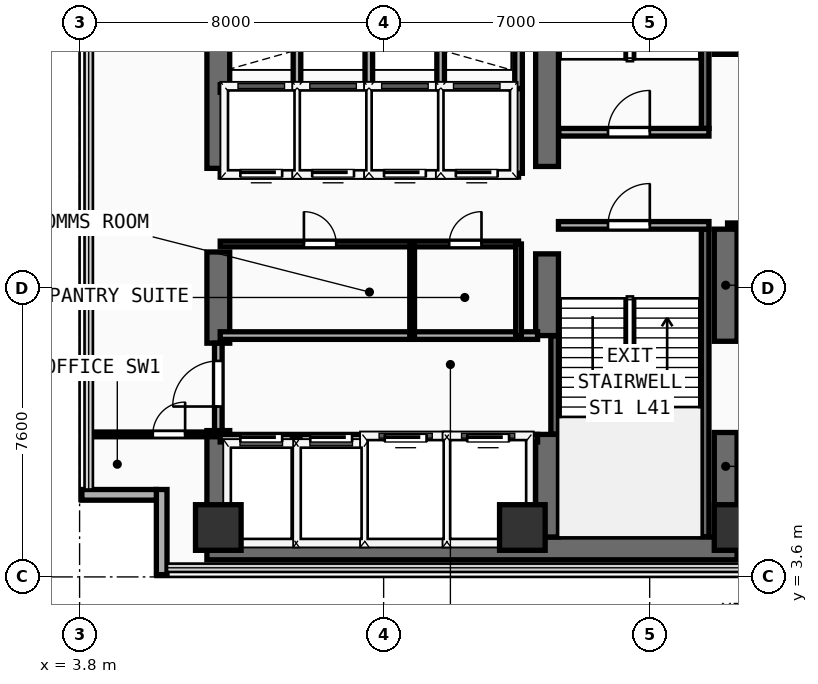
"""IFC4 building model, lengths in metres.
Left out: names, types, materials, properties, quantities, classifications, styles, units other than length and angle.
Written with IfcOpenShell. Run it as: python <this file> out.ifc"""

import sys

from ifc_helpers import new_model, si_unit, direction, frame, frame_2d, origin, origin_2d, place, context, subcontext, project, spatial, rectangle, extrude, element, fill, save


model = new_model("IFC4")
c1 = context("Model", 3, precision=1e-05, world=origin(), true_north=direction((0.0, 1.0)))
c2 = subcontext(c1, "Body", "Model", "MODEL_VIEW")
j1 = project(units=[si_unit("LENGTHUNIT", "METRE"), si_unit("PLANEANGLEUNIT", "RADIAN")], contexts=[c1])
p1 = place(None, origin())
s1 = spatial("IfcSite", under=j1, at=p1, CompositionType="ELEMENT")
p2 = place(p1, origin())
s2 = spatial("IfcBuilding", under=s1, at=p2, CompositionType="ELEMENT")
p3 = place(p2, frame((0.0, 0.0, 161.4)))
s3 = spatial("IfcBuildingStorey", under=s2, at=p3, CompositionType="ELEMENT", Elevation=161.4)
p4 = place(p3, frame((7.15, 4.35, 0.0), z_axis=(0.0, 0.0, 1.0), x_axis=(1.0, 0.0, 0.0)))
e1 = element("IfcWall", 1, at=p4, inside=s3, PredefinedType="SHEAR", context=c2, shape_type="SweptSolid", body=[
    extrude(rectangle(XDim=13.95, YDim=0.6, at=frame_2d((6.975, 0.0))), origin(), (0.0, 0.0, 1.0), 3.56),
])
p5 = place(p3, frame((7.45, 4.65, 0.0), z_axis=(0.0, 0.0, 1.0), x_axis=(0.0, 1.0, 0.0)))
e2 = element("IfcWall", 2, at=p5, inside=s3, PredefinedType="SHEAR", context=c2, shape_type="SweptSolid", body=[
    extrude(rectangle(XDim=2.8, YDim=0.6, at=frame_2d((1.4, 0.0))), origin(), (0.0, 0.0, 1.0), 3.56),
])
p6 = place(p3, frame((7.45, 9.75, 0.0), z_axis=(0.0, 0.0, 1.0), x_axis=(0.0, 1.0, 0.0)))
e3 = element("IfcWall", 3, at=p6, inside=s3, PredefinedType="SHEAR", context=c2, shape_type="SweptSolid", body=[
    extrude(rectangle(XDim=2.4, YDim=0.6, at=frame_2d((1.2, 0.0))), origin(), (0.0, 0.0, 1.0), 3.56),
])
p7 = place(p3, frame((7.45, 14.35, 0.0), z_axis=(0.0, 0.0, 1.0), x_axis=(0.0, 1.0, 0.0)))
e4 = element("IfcWall", 4, at=p7, inside=s3, PredefinedType="SHEAR", context=c2, shape_type="SweptSolid", body=[
    extrude(rectangle(XDim=4.81, YDim=0.6, at=frame_2d((2.405, 0.0))), origin(), (0.0, 0.0, 1.0), 3.56),
])
p8 = place(p3, frame((20.8, 4.65, 0.0), z_axis=(0.0, 0.0, 1.0), x_axis=(0.0, 1.0, 0.0)))
e5 = element("IfcWall", 5, at=p8, inside=s3, PredefinedType="SHEAR", context=c2, shape_type="SweptSolid", body=[
    extrude(rectangle(XDim=2.75, YDim=0.6, at=frame_2d((1.375, 0.0))), origin(), (0.0, 0.0, 1.0), 3.56),
])
p9 = place(p3, frame((20.8, 9.8, 0.0), z_axis=(0.0, 0.0, 1.0), x_axis=(0.0, 1.0, 0.0)))
e6 = element("IfcWall", 6, at=p9, inside=s3, PredefinedType="SHEAR", context=c2, shape_type="SweptSolid", body=[
    extrude(rectangle(XDim=2.95, YDim=0.6, at=frame_2d((1.475, 0.0))), origin(), (0.0, 0.0, 1.0), 3.56),
])
p10 = place(p3, frame((20.8, 17.35, 0.0), z_axis=(0.0, 0.0, 1.0), x_axis=(0.0, 1.0, 0.0)))
e7 = element("IfcWall", 7, at=p10, inside=s3, PredefinedType="SHEAR", context=c2, shape_type="SweptSolid", body=[
    extrude(rectangle(XDim=6.15, YDim=0.6, at=frame_2d((3.075, 0.0))), origin(), (0.0, 0.0, 1.0), 3.56),
])
p11 = place(p3, frame((16.1, 4.65, 0.0), z_axis=(0.0, 0.0, 1.0), x_axis=(0.0, 1.0, 0.0)))
e8 = element("IfcWall", 8, at=p11, inside=s3, PredefinedType="SHEAR", context=c2, shape_type="SweptSolid", body=[
    extrude(rectangle(XDim=2.7, YDim=0.6, at=frame_2d((1.35, 0.0))), origin(), (0.0, 0.0, 1.0), 3.56),
])
p12 = place(p3, frame((16.1, 9.95, 0.0), z_axis=(0.0, 0.0, 1.0), x_axis=(0.0, 1.0, 0.0)))
e9 = element("IfcWall", 9, at=p12, inside=s3, PredefinedType="SHEAR", context=c2, shape_type="SweptSolid", body=[
    extrude(rectangle(XDim=2.15, YDim=0.6, at=frame_2d((1.075, 0.0))), origin(), (0.0, 0.0, 1.0), 3.56),
])
p13 = place(p3, frame((16.1, 14.4, 0.0), z_axis=(0.0, 0.0, 1.0), x_axis=(0.0, 1.0, 0.0)))
e10 = element("IfcWall", 10, at=p13, inside=s3, PredefinedType="SHEAR", context=c2, shape_type="SweptSolid", body=[
    extrude(rectangle(XDim=9.1, YDim=0.6, at=frame_2d((4.55, 0.0))), origin(), (0.0, 0.0, 1.0), 3.56),
])
for number, where, z_axis, x_axis in (
    (11, (7.45, 4.9, 0.0), (0.0, 0.0, 1.0), (1.0, 0.0, 0.0)),
    (12, (15.45, 4.9, 0.0), (0.0, 0.0, 1.0), (1.0, 0.0, 0.0)),
    (13, (21.1, 4.9, 0.0), (0.0, 0.0, 1.0), (1.0, 0.0, 0.0)),
):
    element("IfcColumn", number, at=place(p3, frame(where, z_axis=z_axis, x_axis=x_axis)), inside=s3, PredefinedType="COLUMN", context=c2, shape_type="SweptSolid", body=[
        extrude(rectangle(XDim=1.2, YDim=1.2, at=origin_2d()), origin(), (0.0, 0.0, 1.0), 3.56),
    ])
p14 = place(p3, frame((5.96, 3.66, 0.0), z_axis=(0.0, 0.0, 1.0), x_axis=(0.0, 1.0, 0.0)))
e14 = element("IfcWall", 14, at=p14, inside=s3, PredefinedType="SOLIDWALL", context=c2, shape_type="SweptSolid", body=[
    extrude(rectangle(XDim=2.24, YDim=0.28, at=frame_2d((1.12, 0.0))), origin(), (0.0, 0.0, 1.0), 3.56),
])
p15 = place(p3, frame((3.86, 5.76, 0.0), z_axis=(0.0, 0.0, 1.0), x_axis=(1.0, 0.0, 0.0)))
e15 = element("IfcWall", 15, at=p15, inside=s3, PredefinedType="SOLIDWALL", context=c2, shape_type="SweptSolid", body=[
    extrude(rectangle(XDim=1.96, YDim=0.28, at=frame_2d((0.98, 0.0))), origin(), (0.0, 0.0, 1.0), 3.56),
])
p16 = place(p3, frame((16.3, 7.36, 0.0), z_axis=(0.0, 0.0, 1.0), x_axis=(0.0, 1.0, 0.0)))
e16 = element("IfcWall", 16, at=p16, inside=s3, PredefinedType="SHEAR", context=c2, shape_type="SweptSolid", body=[
    extrude(rectangle(XDim=2.58, YDim=0.2, at=frame_2d((1.29, 0.0))), origin(), (0.0, 0.0, 1.0), 3.56),
])
p17 = place(p3, frame((20.26, 4.66, 0.0), z_axis=(0.0, 0.0, 1.0), x_axis=(0.0, 1.0, 0.0)))
e17 = element("IfcWall", 17, at=p17, inside=s3, PredefinedType="SHEAR", context=c2, shape_type="SweptSolid", body=[
    extrude(rectangle(XDim=8.09, YDim=0.2, at=frame_2d((4.045, 0.0))), origin(), (0.0, 0.0, 1.0), 3.56),
])
p18 = place(p3, frame((16.4, 12.85, 0.0), z_axis=(0.0, 0.0, 1.0), x_axis=(1.0, 0.0, 0.0)))
e18 = element("IfcWall", 18, at=p18, inside=s3, PredefinedType="PARTITIONING", context=c2, shape_type="SweptSolid", body=[
    extrude(rectangle(XDim=3.96, YDim=0.2, at=frame_2d((1.98, 0.0))), origin(), (0.0, 0.0, 1.0), 3.56),
])
p19 = place(p18, frame((1.304, 0.0, 0.0)))
e19 = element("IfcOpeningElement", 19, at=p19, cuts=e18, PredefinedType="OPENING", context=c2, shape_type="SweptSolid", body=[
    extrude(rectangle(XDim=1.1, YDim=2.2, at=frame_2d((0.55, 1.1))), frame((0.0, 0.11, 0.0), z_axis=(0.0, -1.0, 0.0), x_axis=(1.0, 0.0, 0.0)), (0.0, 0.0, 1.0), 0.22),
])
p20 = place(p3, frame((20.26, 15.4, 0.0), z_axis=(0.0, 0.0, 1.0), x_axis=(0.0, 1.0, 0.0)))
e20 = element("IfcWall", 20, at=p20, inside=s3, PredefinedType="SHEAR", context=c2, shape_type="SweptSolid", body=[
    extrude(rectangle(XDim=8.09, YDim=0.2, at=frame_2d((4.045, 0.0))), origin(), (0.0, 0.0, 1.0), 3.56),
])
p21 = place(p3, frame((16.41, 15.3, 0.0), z_axis=(0.0, 0.0, 1.0), x_axis=(1.0, 0.0, 0.0)))
e21 = element("IfcWall", 21, at=p21, inside=s3, PredefinedType="PARTITIONING", context=c2, shape_type="SweptSolid", body=[
    extrude(rectangle(XDim=3.95, YDim=0.2, at=frame_2d((1.975, 0.0))), origin(), (0.0, 0.0, 1.0), 3.56),
])
p22 = place(p21, frame((1.294, 0.0, 0.0)))
e22 = element("IfcOpeningElement", 22, at=p22, cuts=e21, PredefinedType="OPENING", context=c2, shape_type="SweptSolid", body=[
    extrude(rectangle(XDim=1.1, YDim=2.2, at=frame_2d((0.55, 1.1))), frame((0.0, 0.11, 0.0), z_axis=(0.0, -1.0, 0.0), x_axis=(1.0, 0.0, 0.0)), (0.0, 0.0, 1.0), 0.22),
])
p23 = place(p3, frame((7.5, 7.25, 0.0), z_axis=(0.0, 0.0, 1.0), x_axis=(1.0, 0.0, 0.0)))
e23 = element("IfcWall", 23, at=p23, inside=s3, PredefinedType="PARTITIONING", context=c2, shape_type="SweptSolid", body=[
    extrude(rectangle(XDim=8.35, YDim=0.2, at=frame_2d((4.175, 0.0))), origin(), (0.0, 0.0, 1.0), 3.56),
])
p24 = place(p23, frame((0.53, 0.0, 0.0)))
e24 = element("IfcOpeningElement", 24, at=p24, cuts=e23, PredefinedType="OPENING", context=c2, shape_type="SweptSolid", body=[
    extrude(rectangle(XDim=1.1, YDim=2.2, at=frame_2d((0.55, 1.1))), frame((0.0, 0.11, 0.0), z_axis=(0.0, -1.0, 0.0), x_axis=(1.0, 0.0, 0.0)), (0.0, 0.0, 1.0), 0.22),
])
p25 = place(p23, frame((2.37, 0.0, 0.0)))
e25 = element("IfcOpeningElement", 25, at=p25, cuts=e23, PredefinedType="OPENING", context=c2, shape_type="SweptSolid", body=[
    extrude(rectangle(XDim=1.1, YDim=2.2, at=frame_2d((0.55, 1.1))), frame((0.0, 0.11, 0.0), z_axis=(0.0, -1.0, 0.0), x_axis=(1.0, 0.0, 0.0)), (0.0, 0.0, 1.0), 0.22),
])
p26 = place(p23, frame((4.33, 0.0, 0.0)))
e26 = element("IfcOpeningElement", 26, at=p26, cuts=e23, PredefinedType="OPENING", context=c2, shape_type="SweptSolid", body=[
    extrude(rectangle(XDim=1.1, YDim=2.2, at=frame_2d((0.55, 1.1))), frame((0.0, 0.11, 0.0), z_axis=(0.0, -1.0, 0.0), x_axis=(1.0, 0.0, 0.0)), (0.0, 0.0, 1.0), 0.22),
])
p27 = place(p23, frame((6.5, 0.0, 0.0)))
e27 = element("IfcOpeningElement", 27, at=p27, cuts=e23, PredefinedType="OPENING", context=c2, shape_type="SweptSolid", body=[
    extrude(rectangle(XDim=1.1, YDim=2.2, at=frame_2d((0.55, 1.1))), frame((0.0, 0.11, 0.0), z_axis=(0.0, -1.0, 0.0), x_axis=(1.0, 0.0, 0.0)), (0.0, 0.0, 1.0), 0.22),
])
p28 = place(p3, frame((7.5, 9.95, 0.0), z_axis=(0.0, 0.0, 1.0), x_axis=(1.0, 0.0, 0.0)))
e28 = element("IfcWall", 28, at=p28, inside=s3, PredefinedType="PARTITIONING", context=c2, shape_type="SweptSolid", body=[
    extrude(rectangle(XDim=8.35, YDim=0.2, at=frame_2d((4.175, 0.0))), origin(), (0.0, 0.0, 1.0), 3.56),
])
for number, where, z_axis, x_axis in (
    (29, (9.5, 4.45, 0.0), (0.0, 0.0, 1.0), (0.0, 1.0, 0.0)),
    (30, (11.36, 4.45, 0.0), (0.0, 0.0, 1.0), (0.0, 1.0, 0.0)),
    (31, (13.46, 4.45, 0.0), (0.0, 0.0, 1.0), (0.0, 1.0, 0.0)),
):
    element("IfcWall", number, at=place(p3, frame(where, z_axis=z_axis, x_axis=x_axis)), inside=s3, PredefinedType="PARTITIONING", context=c2, shape_type="SweptSolid", body=[
        extrude(rectangle(XDim=2.8, YDim=0.2, at=frame_2d((1.4, 0.0))), origin(), (0.0, 0.0, 1.0), 3.56),
    ])
p29 = place(p3, frame((7.45, 7.45, 0.0), z_axis=(0.0, 0.0, 1.0), x_axis=(0.0, 1.0, 0.0)))
e32 = element("IfcWall", 32, at=p29, inside=s3, PredefinedType="PARTITIONING", context=c2, shape_type="SweptSolid", body=[
    extrude(rectangle(XDim=2.3, YDim=0.2, at=frame_2d((1.15, 0.0))), origin(), (0.0, 0.0, 1.0), 2.54),
])
p30 = place(p29, frame((0.633, 0.0, 0.0)))
e33 = element("IfcOpeningElement", 33, at=p30, cuts=e32, PredefinedType="OPENING", context=c2, shape_type="SweptSolid", body=[
    extrude(rectangle(XDim=1.2, YDim=2.25, at=frame_2d((0.6, 1.125))), frame((0.0, 0.11, 0.0), z_axis=(0.0, -1.0, 0.0), x_axis=(1.0, 0.0, 0.0)), (0.0, 0.0, 1.0), 0.22),
])
p31 = place(p3, frame((7.5, 12.36, 0.0), z_axis=(0.0, 0.0, 1.0), x_axis=(1.0, 0.0, 0.0)))
e34 = element("IfcWall", 34, at=p31, inside=s3, PredefinedType="PARTITIONING", context=c2, shape_type="SweptSolid", body=[
    extrude(rectangle(XDim=7.85, YDim=0.15, at=frame_2d((3.925, 0.0))), origin(), (0.0, 0.0, 1.0), 3.56),
])
p32 = place(p31, frame((2.202, 0.0, 0.0)))
e35 = element("IfcOpeningElement", 35, at=p32, cuts=e34, PredefinedType="OPENING", context=c2, shape_type="SweptSolid", body=[
    extrude(rectangle(XDim=0.85, YDim=2.15, at=frame_2d((0.425, 1.075))), frame((0.0, 0.085, 0.0), z_axis=(0.0, -1.0, 0.0), x_axis=(1.0, 0.0, 0.0)), (0.0, 0.0, 1.0), 0.17),
])
p33 = place(p31, frame((6.025, 0.0, 0.0)))
e36 = element("IfcOpeningElement", 36, at=p33, cuts=e34, PredefinedType="OPENING", context=c2, shape_type="SweptSolid", body=[
    extrude(rectangle(XDim=0.85, YDim=2.15, at=frame_2d((0.425, 1.075))), frame((0.0, 0.085, 0.0), z_axis=(0.0, -1.0, 0.0), x_axis=(1.0, 0.0, 0.0)), (0.0, 0.0, 1.0), 0.17),
])
p34 = place(p3, frame((15.35, 9.95, 0.0), z_axis=(0.0, 0.0, 1.0), x_axis=(0.0, 1.0, 0.0)))
e37 = element("IfcWall", 37, at=p34, inside=s3, PredefinedType="PARTITIONING", context=c2, shape_type="SweptSolid", body=[
    extrude(rectangle(XDim=2.41, YDim=0.15, at=frame_2d((1.205, 0.0))), origin(), (0.0, 0.0, 1.0), 3.56),
])
p35 = place(p3, frame((12.55, 9.95, 0.0), z_axis=(0.0, 0.0, 1.0), x_axis=(0.0, 1.0, 0.0)))
e38 = element("IfcWall", 38, at=p35, inside=s3, PredefinedType="PARTITIONING", context=c2, shape_type="SweptSolid", body=[
    extrude(rectangle(XDim=2.41, YDim=0.125, at=frame_2d((1.205, 0.0))), origin(), (0.0, 0.0, 1.0), 3.56),
])
p36 = place(p3, frame((7.5, 14.22, 0.0), z_axis=(0.0, 0.0, 1.0), x_axis=(1.0, 0.0, 0.0)))
e39 = element("IfcWall", 39, at=p36, inside=s3, PredefinedType="PARTITIONING", context=c2, shape_type="SweptSolid", body=[
    extrude(rectangle(XDim=7.85, YDim=0.2, at=frame_2d((3.925, 0.0))), origin(), (0.0, 0.0, 1.0), 3.56),
])
p37 = place(p36, frame((0.53, 0.0, 0.0)))
e40 = element("IfcOpeningElement", 40, at=p37, cuts=e39, PredefinedType="OPENING", context=c2, shape_type="SweptSolid", body=[
    extrude(rectangle(XDim=1.1, YDim=2.2, at=frame_2d((0.55, 1.1))), frame((0.0, 0.11, 0.0), z_axis=(0.0, -1.0, 0.0), x_axis=(1.0, 0.0, 0.0)), (0.0, 0.0, 1.0), 0.22),
])
p38 = place(p36, frame((2.42, 0.0, 0.0)))
e41 = element("IfcOpeningElement", 41, at=p38, cuts=e39, PredefinedType="OPENING", context=c2, shape_type="SweptSolid", body=[
    extrude(rectangle(XDim=1.1, YDim=2.2, at=frame_2d((0.55, 1.1))), frame((0.0, 0.11, 0.0), z_axis=(0.0, -1.0, 0.0), x_axis=(1.0, 0.0, 0.0)), (0.0, 0.0, 1.0), 0.22),
])
p39 = place(p36, frame((4.31, 0.0, 0.0)))
e42 = element("IfcOpeningElement", 42, at=p39, cuts=e39, PredefinedType="OPENING", context=c2, shape_type="SweptSolid", body=[
    extrude(rectangle(XDim=1.1, YDim=2.2, at=frame_2d((0.55, 1.1))), frame((0.0, 0.11, 0.0), z_axis=(0.0, -1.0, 0.0), x_axis=(1.0, 0.0, 0.0)), (0.0, 0.0, 1.0), 0.22),
])
p40 = place(p36, frame((6.2, 0.0, 0.0)))
e43 = element("IfcOpeningElement", 43, at=p40, cuts=e39, PredefinedType="OPENING", context=c2, shape_type="SweptSolid", body=[
    extrude(rectangle(XDim=1.1, YDim=2.2, at=frame_2d((0.55, 1.1))), frame((0.0, 0.11, 0.0), z_axis=(0.0, -1.0, 0.0), x_axis=(1.0, 0.0, 0.0)), (0.0, 0.0, 1.0), 0.22),
])
p41 = place(p3, frame((7.5, 16.45, 0.0), z_axis=(0.0, 0.0, 1.0), x_axis=(1.0, 0.0, 0.0)))
e44 = element("IfcWall", 44, at=p41, inside=s3, PredefinedType="PARTITIONING", context=c2, shape_type="SweptSolid", body=[
    extrude(rectangle(XDim=7.85, YDim=0.2, at=frame_2d((3.925, 0.0))), origin(), (0.0, 0.0, 1.0), 3.56),
])
for number, where, z_axis, x_axis in (
    (45, (15.35, 14.22, 0.0), (0.0, 0.0, 1.0), (0.0, 1.0, 0.0)),
    (46, (9.52, 14.22, 0.0), (0.0, 0.0, 1.0), (0.0, 1.0, 0.0)),
    (47, (11.41, 14.22, 0.0), (0.0, 0.0, 1.0), (0.0, 1.0, 0.0)),
    (48, (13.3, 14.22, 0.0), (0.0, 0.0, 1.0), (0.0, 1.0, 0.0)),
):
    element("IfcWall", number, at=place(p3, frame(where, z_axis=z_axis, x_axis=x_axis)), inside=s3, PredefinedType="PARTITIONING", context=c2, shape_type="SweptSolid", body=[
        extrude(rectangle(XDim=2.23, YDim=0.2, at=frame_2d((1.115, 0.0))), origin(), (0.0, 0.0, 1.0), 3.56),
    ])
for number, where, z_axis, x_axis in (
    (49, (15.35, 16.45, 0.0), (0.0, 0.0, 1.0), (0.0, 1.0, 0.0)),
    (50, (9.52, 16.45, 0.0), (0.0, 0.0, 1.0), (0.0, 1.0, 0.0)),
    (51, (11.41, 16.45, 0.0), (0.0, 0.0, 1.0), (0.0, 1.0, 0.0)),
    (52, (13.3, 16.45, 0.0), (0.0, 0.0, 1.0), (0.0, 1.0, 0.0)),
):
    element("IfcWall", number, at=place(p3, frame(where, z_axis=z_axis, x_axis=x_axis)), inside=s3, PredefinedType="PARTITIONING", context=c2, shape_type="SweptSolid", body=[
        extrude(rectangle(XDim=2.67, YDim=0.2, at=frame_2d((1.335, 0.0))), origin(), (0.0, 0.0, 1.0), 3.56),
    ])
p42 = place(p3, frame((4.04, 7.35, 0.0), z_axis=(0.0, 0.0, 1.0), x_axis=(1.0, 0.0, 0.0)))
e53 = element("IfcWall", 53, at=p42, inside=s3, PredefinedType="PARTITIONING", context=c2, shape_type="SweptSolid", body=[
    extrude(rectangle(XDim=3.36, YDim=0.125, at=frame_2d((1.68, 0.0))), origin(), (0.0, 0.0, 1.0), 3.56),
])
p43 = place(p42, frame((1.687, 0.0, 0.0)))
e54 = element("IfcOpeningElement", 54, at=p43, cuts=e53, PredefinedType="OPENING", context=c2, shape_type="SweptSolid", body=[
    extrude(rectangle(XDim=0.85, YDim=2.15, at=frame_2d((0.425, 1.075))), frame((0.0, 0.073, 0.0), z_axis=(0.0, -1.0, 0.0), x_axis=(1.0, 0.0, 0.0)), (0.0, 0.0, 1.0), 0.145),
])
p44 = place(p3, frame((20.85, 12.85, 0.0), z_axis=(0.0, 0.0, 1.0), x_axis=(1.0, 0.0, 0.0)))
e55 = element("IfcWall", 55, at=p44, inside=s3, PredefinedType="PARTITIONING", context=c2, shape_type="SweptSolid", body=[
    extrude(rectangle(XDim=7.05, YDim=0.125, at=frame_2d((3.525, 0.0))), origin(), (0.0, 0.0, 1.0), 3.56),
])
p45 = place(p44, frame((2.8, 0.0, 0.0)))
e56 = element("IfcOpeningElement", 56, at=p45, cuts=e55, PredefinedType="OPENING", context=c2, shape_type="SweptSolid", body=[
    extrude(rectangle(XDim=0.95, YDim=2.15, at=frame_2d((0.475, 1.075))), frame((0.0, 0.073, 0.0), z_axis=(0.0, -1.0, 0.0), x_axis=(1.0, 0.0, 0.0)), (0.0, 0.0, 1.0), 0.145),
])
p46 = place(p19, frame((1.1, 0.0, 0.0), z_axis=(0.0, 0.0, 1.0), x_axis=(-1.0, 0.0, 0.0)))
e57 = element("IfcDoor", 57, at=p46, inside=s3, OperationType="SINGLE_SWING_LEFT", PredefinedType="DOOR", context=c2, shape_type="SweptSolid", body=[
    extrude(rectangle(XDim=1.1, YDim=2.2, at=frame_2d((0.55, 1.1))), frame((0.0, 0.025, 0.0), z_axis=(0.0, -1.0, 0.0), x_axis=(1.0, 0.0, 0.0)), (0.0, 0.0, 1.0), 0.05),
])
fill(e19, e57)
p47 = place(p22, origin())
e58 = element("IfcDoor", 58, at=p47, inside=s3, OperationType="SINGLE_SWING_RIGHT", PredefinedType="DOOR", context=c2, shape_type="SweptSolid", body=[
    extrude(rectangle(XDim=1.1, YDim=2.2, at=frame_2d((0.55, 1.1))), frame((0.0, 0.025, 0.0), z_axis=(0.0, -1.0, 0.0), x_axis=(1.0, 0.0, 0.0)), (0.0, 0.0, 1.0), 0.05),
])
fill(e22, e58)
p48 = place(p24, origin())
e59 = element("IfcDoor", 59, at=p48, inside=s3, OperationType="SLIDING_TO_LEFT", PredefinedType="DOOR", context=c2, shape_type="SweptSolid", body=[
    extrude(rectangle(XDim=1.1, YDim=2.2, at=frame_2d((0.55, 1.1))), frame((0.0, 0.025, 0.0), z_axis=(0.0, -1.0, 0.0), x_axis=(1.0, 0.0, 0.0)), (0.0, 0.0, 1.0), 0.05),
])
fill(e24, e59)
p49 = place(p25, origin())
e60 = element("IfcDoor", 60, at=p49, inside=s3, OperationType="SLIDING_TO_LEFT", PredefinedType="DOOR", context=c2, shape_type="SweptSolid", body=[
    extrude(rectangle(XDim=1.1, YDim=2.2, at=frame_2d((0.55, 1.1))), frame((0.0, 0.025, 0.0), z_axis=(0.0, -1.0, 0.0), x_axis=(1.0, 0.0, 0.0)), (0.0, 0.0, 1.0), 0.05),
])
fill(e25, e60)
p50 = place(p26, origin())
e61 = element("IfcDoor", 61, at=p50, inside=s3, OperationType="SLIDING_TO_LEFT", PredefinedType="DOOR", context=c2, shape_type="SweptSolid", body=[
    extrude(rectangle(XDim=1.1, YDim=2.2, at=frame_2d((0.55, 1.1))), frame((0.0, 0.025, 0.0), z_axis=(0.0, -1.0, 0.0), x_axis=(1.0, 0.0, 0.0)), (0.0, 0.0, 1.0), 0.05),
])
fill(e26, e61)
p51 = place(p27, origin())
e62 = element("IfcDoor", 62, at=p51, inside=s3, OperationType="SLIDING_TO_LEFT", PredefinedType="DOOR", context=c2, shape_type="SweptSolid", body=[
    extrude(rectangle(XDim=1.1, YDim=2.2, at=frame_2d((0.55, 1.1))), frame((0.0, 0.025, 0.0), z_axis=(0.0, -1.0, 0.0), x_axis=(1.0, 0.0, 0.0)), (0.0, 0.0, 1.0), 0.05),
])
fill(e27, e62)
p52 = place(p30, frame((1.2, 0.0, 0.0), z_axis=(0.0, 0.0, 1.0), x_axis=(-1.0, 0.0, 0.0)))
e63 = element("IfcDoor", 63, at=p52, inside=s3, OperationType="SINGLE_SWING_RIGHT", PredefinedType="DOOR", context=c2, shape_type="SweptSolid", body=[
    extrude(rectangle(XDim=1.2, YDim=2.25, at=frame_2d((0.6, 1.125))), frame((0.0, 0.025, 0.0), z_axis=(0.0, -1.0, 0.0), x_axis=(1.0, 0.0, 0.0)), (0.0, 0.0, 1.0), 0.05),
])
fill(e33, e63)
p53 = place(p32, origin())
e64 = element("IfcDoor", 64, at=p53, inside=s3, OperationType="SINGLE_SWING_LEFT", PredefinedType="DOOR", context=c2, shape_type="SweptSolid", body=[
    extrude(rectangle(XDim=0.85, YDim=2.15, at=frame_2d((0.425, 1.075))), frame((0.0, 0.025, 0.0), z_axis=(0.0, -1.0, 0.0), x_axis=(1.0, 0.0, 0.0)), (0.0, 0.0, 1.0), 0.05),
])
fill(e35, e64)
p54 = place(p33, origin())
e65 = element("IfcDoor", 65, at=p54, inside=s3, OperationType="SINGLE_SWING_RIGHT", PredefinedType="DOOR", context=c2, shape_type="SweptSolid", body=[
    extrude(rectangle(XDim=0.85, YDim=2.15, at=frame_2d((0.425, 1.075))), frame((0.0, 0.025, 0.0), z_axis=(0.0, -1.0, 0.0), x_axis=(1.0, 0.0, 0.0)), (0.0, 0.0, 1.0), 0.05),
])
fill(e36, e65)
p55 = place(p37, frame((1.1, 0.0, 0.0), z_axis=(0.0, 0.0, 1.0), x_axis=(-1.0, 0.0, 0.0)))
e66 = element("IfcDoor", 66, at=p55, inside=s3, OperationType="SLIDING_TO_LEFT", PredefinedType="DOOR", context=c2, shape_type="SweptSolid", body=[
    extrude(rectangle(XDim=1.1, YDim=2.2, at=frame_2d((0.55, 1.1))), frame((0.0, 0.025, 0.0), z_axis=(0.0, -1.0, 0.0), x_axis=(1.0, 0.0, 0.0)), (0.0, 0.0, 1.0), 0.05),
])
fill(e40, e66)
p56 = place(p38, frame((1.1, 0.0, 0.0), z_axis=(0.0, 0.0, 1.0), x_axis=(-1.0, 0.0, 0.0)))
e67 = element("IfcDoor", 67, at=p56, inside=s3, OperationType="SLIDING_TO_LEFT", PredefinedType="DOOR", context=c2, shape_type="SweptSolid", body=[
    extrude(rectangle(XDim=1.1, YDim=2.2, at=frame_2d((0.55, 1.1))), frame((0.0, 0.025, 0.0), z_axis=(0.0, -1.0, 0.0), x_axis=(1.0, 0.0, 0.0)), (0.0, 0.0, 1.0), 0.05),
])
fill(e41, e67)
p57 = place(p39, frame((1.1, 0.0, 0.0), z_axis=(0.0, 0.0, 1.0), x_axis=(-1.0, 0.0, 0.0)))
e68 = element("IfcDoor", 68, at=p57, inside=s3, OperationType="SLIDING_TO_LEFT", PredefinedType="DOOR", context=c2, shape_type="SweptSolid", body=[
    extrude(rectangle(XDim=1.1, YDim=2.2, at=frame_2d((0.55, 1.1))), frame((0.0, 0.025, 0.0), z_axis=(0.0, -1.0, 0.0), x_axis=(1.0, 0.0, 0.0)), (0.0, 0.0, 1.0), 0.05),
])
fill(e42, e68)
p58 = place(p40, frame((1.1, 0.0, 0.0), z_axis=(0.0, 0.0, 1.0), x_axis=(-1.0, 0.0, 0.0)))
e69 = element("IfcDoor", 69, at=p58, inside=s3, OperationType="SLIDING_TO_LEFT", PredefinedType="DOOR", context=c2, shape_type="SweptSolid", body=[
    extrude(rectangle(XDim=1.1, YDim=2.2, at=frame_2d((0.55, 1.1))), frame((0.0, 0.025, 0.0), z_axis=(0.0, -1.0, 0.0), x_axis=(1.0, 0.0, 0.0)), (0.0, 0.0, 1.0), 0.05),
])
fill(e43, e69)
p59 = place(p43, origin())
e70 = element("IfcDoor", 70, at=p59, inside=s3, OperationType="SINGLE_SWING_RIGHT", PredefinedType="DOOR", context=c2, shape_type="SweptSolid", body=[
    extrude(rectangle(XDim=0.85, YDim=2.15, at=frame_2d((0.425, 1.075))), frame((0.0, 0.025, 0.0), z_axis=(0.0, -1.0, 0.0), x_axis=(1.0, 0.0, 0.0)), (0.0, 0.0, 1.0), 0.05),
])
fill(e54, e70)
save(model, sys.argv[1])
